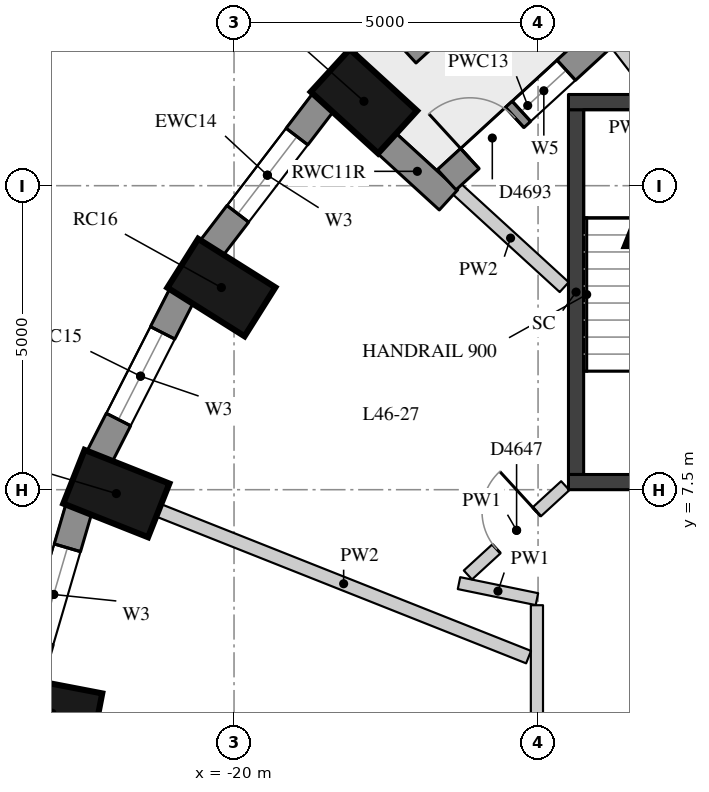
"""IFC4 building model, lengths in metres.
Left out: names, types, materials, properties, quantities, classifications, styles, units other than length and angle.
Written with IfcOpenShell. Run it as: python <this file> out.ifc"""

import sys

from ifc_helpers import new_model, si_unit, direction, frame, frame_2d, origin, origin_2d, place, context, subcontext, project, spatial, rectangle, extrude, element, fill, save


model = new_model("IFC4")
c1 = context("Model", 3, precision=1e-05, world=origin(), true_north=direction((0.0, 1.0)))
c2 = subcontext(c1, "Body", "Model", "MODEL_VIEW")
j1 = project(units=[si_unit("LENGTHUNIT", "METRE"), si_unit("PLANEANGLEUNIT", "RADIAN")], contexts=[c1])
p1 = place(None, origin())
s1 = spatial("IfcSite", under=j1, at=p1, CompositionType="ELEMENT")
p2 = place(p1, origin())
s2 = spatial("IfcBuilding", under=s1, at=p2, CompositionType="ELEMENT")
p3 = place(p2, frame((0.0, 0.0, 164.9)))
s3 = spatial("IfcBuildingStorey", under=s2, at=p3, CompositionType="ELEMENT", Elevation=164.9)
for number, where, z_axis, x_axis in (
    (1, (-17.864, 13.888, 0.0), (0.0, 0.0, 1.0), (-0.738, 0.675, 0.0)),
    (2, (-20.208, 10.825, 0.0), (0.0, 0.0, 1.0), (-0.846, 0.533, 0.0)),
    (3, (-21.936, 7.436, 0.0), (0.0, 0.0, 1.0), (-0.93, 0.369, 0.0)),
    (4, (-22.994, 3.825, 0.0), (0.0, 0.0, 1.0), (-0.982, 0.189, 0.0)),
):
    element("IfcColumn", number, at=place(p3, frame(where, z_axis=z_axis, x_axis=x_axis)), inside=s3, PredefinedType="COLUMN", context=c2, shape_type="SweptSolid", body=[
        extrude(rectangle(XDim=1.5, YDim=0.95, at=origin_2d()), origin(), (0.0, 0.0, 1.0), 3.3),
    ])
p4 = place(p3, frame((-18.528, 13.879, 0.0), z_axis=(0.0, 0.0, 1.0), x_axis=(-0.607817056371, -0.794077090706, 0.0)))
e5 = element("IfcWall", 5, at=p4, inside=s3, PredefinedType="SOLIDWALL", context=c2, shape_type="SweptSolid", body=[
    extrude(rectangle(XDim=3.037, YDim=0.45, at=frame_2d((1.519, 0.0))), origin(), (0.0, 0.0, 1.0), 3.02),
])
p5 = place(p4, frame((0.719, 0.0, 0.4)))
e6 = element("IfcOpeningElement", 6, at=p5, cuts=e5, PredefinedType="OPENING", context=c2, shape_type="SweptSolid", body=[
    extrude(rectangle(XDim=1.6, YDim=1.75, at=frame_2d((0.8, 0.875))), frame((0.0, 0.235, 0.0), z_axis=(0.0, -1.0, 0.0), x_axis=(1.0, 0.0, 0.0)), (0.0, 0.0, 1.0), 0.47),
])
p6 = place(p3, frame((-20.859, 10.697, 0.0), z_axis=(0.0, 0.0, 1.0), x_axis=(-0.454133999889, -0.890933392653, 0.0)))
e7 = element("IfcWall", 7, at=p6, inside=s3, PredefinedType="SOLIDWALL", context=c2, shape_type="SweptSolid", body=[
    extrude(rectangle(XDim=2.986, YDim=0.45, at=frame_2d((1.493, 0.0))), origin(), (0.0, 0.0, 1.0), 3.02),
])
p7 = place(p6, frame((0.693, 0.0, 0.4)))
e8 = element("IfcOpeningElement", 8, at=p7, cuts=e7, PredefinedType="OPENING", context=c2, shape_type="SweptSolid", body=[
    extrude(rectangle(XDim=1.6, YDim=1.75, at=frame_2d((0.8, 0.875))), frame((0.0, 0.235, 0.0), z_axis=(0.0, -1.0, 0.0), x_axis=(1.0, 0.0, 0.0)), (0.0, 0.0, 1.0), 0.47),
])
p8 = place(p3, frame((-22.551, 7.191, 0.0), z_axis=(0.0, 0.0, 1.0), x_axis=(-0.281125768296, -0.959670934435, 0.0)))
e9 = element("IfcWall", 9, at=p8, inside=s3, PredefinedType="SOLIDWALL", context=c2, shape_type="SweptSolid", body=[
    extrude(rectangle(XDim=2.948, YDim=0.45, at=frame_2d((1.474, 0.0))), origin(), (0.0, 0.0, 1.0), 3.02),
])
p9 = place(p8, frame((0.674, 0.0, 0.4)))
e10 = element("IfcOpeningElement", 10, at=p9, cuts=e9, PredefinedType="OPENING", context=c2, shape_type="SweptSolid", body=[
    extrude(rectangle(XDim=1.6, YDim=1.75, at=frame_2d((0.8, 0.875))), frame((0.0, 0.235, 0.0), z_axis=(0.0, -1.0, 0.0), x_axis=(1.0, 0.0, 0.0)), (0.0, 0.0, 1.0), 0.47),
])
p10 = place(p3, frame((-17.499, 13.205, 0.0), z_axis=(0.0, 0.0, 1.0), x_axis=(0.737918885826, -0.674889411638, 0.0)))
e11 = element("IfcWall", 11, at=p10, inside=s3, PredefinedType="SOLIDWALL", context=c2, shape_type="SweptSolid", body=[
    extrude(rectangle(XDim=1.391, YDim=0.45, at=frame_2d((0.695, 0.0))), origin(), (0.0, 0.0, 1.0), 3.02),
])
p11 = place(p3, frame((-13.839, 15.039, 0.0), z_axis=(0.0, 0.0, 1.0), x_axis=(-0.736971705023, -0.675923594791, 0.0)))
e12 = element("IfcWall", 12, at=p11, inside=s3, PredefinedType="SOLIDWALL", context=c2, shape_type="SweptSolid", body=[
    extrude(rectangle(XDim=3.611, YDim=0.45, at=frame_2d((1.806, 0.0))), origin(), (0.0, 0.0, 1.0), 3.02),
])
p12 = place(p11, frame((0.946, 0.0, 0.4)))
e13 = element("IfcOpeningElement", 13, at=p12, cuts=e12, PredefinedType="OPENING", context=c2, shape_type="SweptSolid", body=[
    extrude(rectangle(XDim=1.0, YDim=1.75, at=frame_2d((0.5, 0.875))), frame((0.0, 0.235, 0.0), z_axis=(0.0, -1.0, 0.0), x_axis=(1.0, 0.0, 0.0)), (0.0, 0.0, 1.0), 0.47),
])
p13 = place(p11, frame((2.096, 0.0, 0.0)))
e14 = element("IfcOpeningElement", 14, at=p13, cuts=e12, PredefinedType="OPENING", context=c2, shape_type="SweptSolid", body=[
    extrude(rectangle(XDim=1.0, YDim=2.15, at=frame_2d((0.5, 1.075))), frame((0.0, 0.235, 0.0), z_axis=(0.0, -1.0, 0.0), x_axis=(1.0, 0.0, 0.0)), (0.0, 0.0, 1.0), 0.47),
])
p14 = place(p3, frame((-15.916, 15.991, 0.0), z_axis=(0.0, 0.0, 1.0), x_axis=(-0.737874397391, -0.674938051731, 0.0)))
e15 = element("IfcWall", 15, at=p14, inside=s3, PredefinedType="USERDEFINED", context=c2, shape_type="SweptSolid", body=[
    extrude(rectangle(XDim=1.8, YDim=0.7, at=frame_2d((0.9, 0.0))), origin(), (0.0, 0.0, 1.0), 0.75),
])
p15 = place(p3, frame((-14.375, 7.75, -0.28), z_axis=(0.0, 0.0, 1.0), x_axis=(0.0, 1.0, 0.0)))
e16 = element("IfcWall", 16, at=p15, inside=s3, PredefinedType="SHEAR", context=c2, shape_type="SweptSolid", body=[
    extrude(rectangle(XDim=6.0, YDim=0.25, at=frame_2d((3.0, 0.0))), origin(), (0.0, 0.0, 1.0), 3.3),
])
for number, where, z_axis, x_axis in (
    (17, (-14.5, 13.875, -0.28), (0.0, 0.0, 1.0), (1.0, 0.0, 0.0)),
    (18, (-14.5, 7.625, -0.28), (0.0, 0.0, 1.0), (1.0, 0.0, 0.0)),
):
    element("IfcWall", number, at=place(p3, frame(where, z_axis=z_axis, x_axis=x_axis)), inside=s3, PredefinedType="SHEAR", context=c2, shape_type="SweptSolid", body=[
        extrude(rectangle(XDim=5.2, YDim=0.25, at=frame_2d((2.6, 0.0))), origin(), (0.0, 0.0, 1.0), 3.3),
    ])
p16 = place(p3, frame((-15.019, 5.7, 0.0), z_axis=(0.0, 0.0, 1.0), x_axis=(-0.979555577822, 0.201173730785, 0.0)))
e19 = element("IfcWall", 19, at=p16, inside=s3, PredefinedType="PARTITIONING", context=c2, shape_type="SweptSolid", body=[
    extrude(rectangle(XDim=1.308, YDim=0.2, at=frame_2d((0.654, 0.0))), origin(), (0.0, 0.0, 1.0), 3.02),
])
p17 = place(p3, frame((-16.154, 6.097, 0.0), z_axis=(0.0, 0.0, 1.0), x_axis=(0.736958194284, 0.675938325498, 0.0)))
e20 = element("IfcWall", 20, at=p17, inside=s3, PredefinedType="PARTITIONING", context=c2, shape_type="SweptSolid", body=[
    extrude(rectangle(XDim=2.173, YDim=0.2, at=frame_2d((1.086, 0.0))), origin(), (0.0, 0.0, 1.0), 3.02),
])
p18 = place(p17, frame((0.636, 0.0, 0.0)))
e21 = element("IfcOpeningElement", 21, at=p18, cuts=e20, PredefinedType="OPENING", context=c2, shape_type="SweptSolid", body=[
    extrude(rectangle(XDim=0.9, YDim=2.1, at=frame_2d((0.45, 1.05))), frame((0.0, 0.11, 0.0), z_axis=(0.0, -1.0, 0.0), x_axis=(1.0, 0.0, 0.0)), (0.0, 0.0, 1.0), 0.22),
])
p19 = place(p3, frame((-15.019, -5.6, 0.0), z_axis=(0.0, 0.0, 1.0), x_axis=(0.0, 1.0, 0.0)))
e22 = element("IfcWall", 22, at=p19, inside=s3, PredefinedType="PARTITIONING", context=c2, shape_type="SweptSolid", body=[
    extrude(rectangle(XDim=11.2, YDim=0.2, at=frame_2d((5.6, 0.0))), origin(), (0.0, 0.0, 1.0), 2.52),
])
p20 = place(p19, frame((6.436, 0.0, 0.0)))
e23 = element("IfcOpeningElement", 23, at=p20, cuts=e22, PredefinedType="OPENING", context=c2, shape_type="SweptSolid", body=[
    extrude(rectangle(XDim=1.1, YDim=2.1, at=frame_2d((0.55, 1.05))), frame((0.0, 0.11, 0.0), z_axis=(0.0, -1.0, 0.0), x_axis=(1.0, 0.0, 0.0)), (0.0, 0.0, 1.0), 0.22),
])
p21 = place(p19, frame((3.663, 0.0, 0.0)))
e24 = element("IfcOpeningElement", 24, at=p21, cuts=e22, PredefinedType="OPENING", context=c2, shape_type="SweptSolid", body=[
    extrude(rectangle(XDim=1.1, YDim=2.1, at=frame_2d((0.55, 1.05))), frame((0.0, 0.11, 0.0), z_axis=(0.0, -1.0, 0.0), x_axis=(1.0, 0.0, 0.0)), (0.0, 0.0, 1.0), 0.22),
])
p22 = place(p3, frame((-13.716, 14.846, 0.0), z_axis=(0.0, 0.0, 1.0), x_axis=(0.609971806764, -0.792423116115, 0.0)))
e25 = element("IfcWall", 25, at=p22, inside=s3, PredefinedType="PARTITIONING", context=c2, shape_type="SweptSolid", body=[
    extrude(rectangle(XDim=0.994, YDim=0.22, at=frame_2d((0.497, 0.0))), origin(), (0.0, 0.0, 1.0), 2.57),
])
p23 = place(p3, frame((-16.334, 12.445, 0.0), z_axis=(0.0, 0.0, 1.0), x_axis=(0.737857346278, -0.674956692347, 0.0)))
e26 = element("IfcWall", 26, at=p23, inside=s3, PredefinedType="PARTITIONING", context=c2, shape_type="SweptSolid", body=[
    extrude(rectangle(XDim=2.391, YDim=0.22, at=frame_2d((1.195, 0.0))), origin(), (0.0, 0.0, 1.0), 3.02),
])
p24 = place(p3, frame((-21.239, 7.16, 0.0), z_axis=(0.0, 0.0, 1.0), x_axis=(0.929520145478, -0.368771337215, 0.0)))
e27 = element("IfcWall", 27, at=p24, inside=s3, PredefinedType="PARTITIONING", context=c2, shape_type="SweptSolid", body=[
    extrude(rectangle(XDim=6.544, YDim=0.22, at=frame_2d((3.272, 0.0))), origin(), (0.0, 0.0, 1.0), 3.02),
])
p25 = place(p3, frame((-13.554, 0.0, 0.0), z_axis=(0.0, 0.0, 1.0), x_axis=(0.382730523909, 0.923860025149, 0.0)))
e28 = element("IfcWall", 28, at=p25, inside=s3, PredefinedType="PARTITIONING", context=c2, shape_type="SweptSolid", body=[
    extrude(rectangle(XDim=4.251, YDim=0.1, at=frame_2d((2.125, 0.0))), origin(), (0.0, 0.0, 1.0), 3.02),
])
p26 = place(p5, origin())
e29 = element("IfcWindow", 29, at=p26, inside=s3, PartitioningType="SINGLE_PANEL", PredefinedType="WINDOW", context=c2, shape_type="SweptSolid", body=[
    extrude(rectangle(XDim=1.6, YDim=1.75, at=frame_2d((0.8, 0.875))), frame((0.0, 0.035, 0.0), z_axis=(0.0, -1.0, 0.0), x_axis=(1.0, 0.0, 0.0)), (0.0, 0.0, 1.0), 0.06),
])
fill(e6, e29)
p27 = place(p7, origin())
e30 = element("IfcWindow", 30, at=p27, inside=s3, PartitioningType="SINGLE_PANEL", PredefinedType="WINDOW", context=c2, shape_type="SweptSolid", body=[
    extrude(rectangle(XDim=1.6, YDim=1.75, at=frame_2d((0.8, 0.875))), frame((0.0, 0.035, 0.0), z_axis=(0.0, -1.0, 0.0), x_axis=(1.0, 0.0, 0.0)), (0.0, 0.0, 1.0), 0.06),
])
fill(e8, e30)
p28 = place(p9, origin())
e31 = element("IfcWindow", 31, at=p28, inside=s3, PartitioningType="SINGLE_PANEL", PredefinedType="WINDOW", context=c2, shape_type="SweptSolid", body=[
    extrude(rectangle(XDim=1.6, YDim=1.75, at=frame_2d((0.8, 0.875))), frame((0.0, 0.035, 0.0), z_axis=(0.0, -1.0, 0.0), x_axis=(1.0, 0.0, 0.0)), (0.0, 0.0, 1.0), 0.06),
])
fill(e10, e31)
p29 = place(p12, origin())
e32 = element("IfcWindow", 32, at=p29, inside=s3, PartitioningType="SINGLE_PANEL", PredefinedType="WINDOW", context=c2, shape_type="SweptSolid", body=[
    extrude(rectangle(XDim=1.0, YDim=1.75, at=frame_2d((0.5, 0.875))), frame((0.0, 0.035, 0.0), z_axis=(0.0, -1.0, 0.0), x_axis=(1.0, 0.0, 0.0)), (0.0, 0.0, 1.0), 0.06),
])
fill(e13, e32)
p30 = place(p13, origin())
e33 = element("IfcDoor", 33, at=p30, inside=s3, OperationType="SINGLE_SWING_LEFT", PredefinedType="DOOR", context=c2, shape_type="SweptSolid", body=[
    extrude(rectangle(XDim=1.0, YDim=2.15, at=frame_2d((0.5, 1.075))), frame((0.0, -0.025, 0.0), z_axis=(0.0, -1.0, 0.0), x_axis=(1.0, 0.0, 0.0)), (0.0, 0.0, 1.0), 0.05),
])
fill(e14, e33)
p31 = place(p18, origin())
e34 = element("IfcDoor", 34, at=p31, inside=s3, OperationType="SINGLE_SWING_RIGHT", PredefinedType="DOOR", context=c2, shape_type="SweptSolid", body=[
    extrude(rectangle(XDim=0.9, YDim=2.1, at=frame_2d((0.45, 1.05))), frame((0.0, 0.025, 0.0), z_axis=(0.0, -1.0, 0.0), x_axis=(1.0, 0.0, 0.0)), (0.0, 0.0, 1.0), 0.05),
])
fill(e21, e34)
save(model, sys.argv[1])
